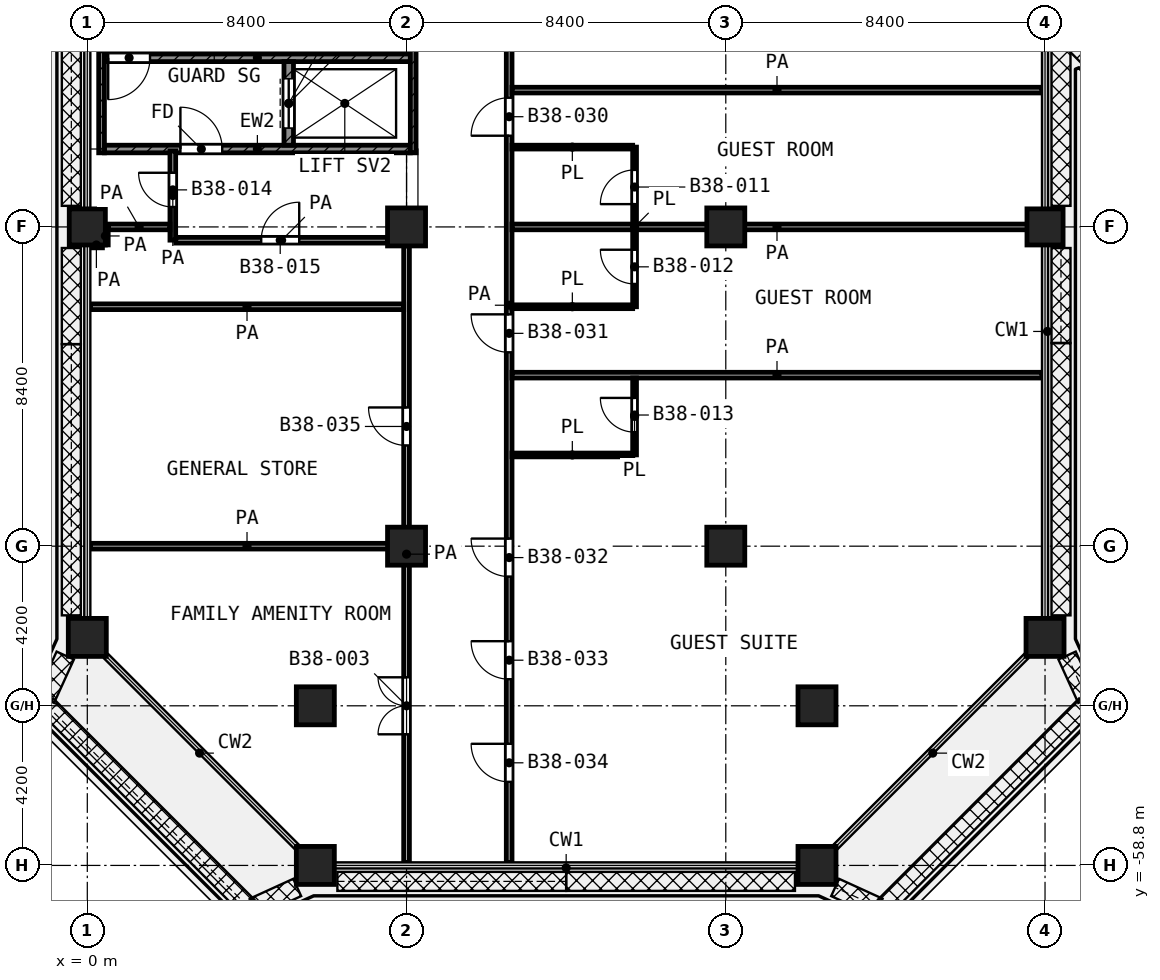
"""IFC4 building model, lengths in metres.
Left out: names, types, materials, properties, quantities, classifications, styles, units other than length and angle.
Written with IfcOpenShell. Run it as: python <this file> out.ifc"""

import sys

from ifc_helpers import new_model, si_unit, direction, frame, frame_2d, origin, origin_2d, place, context, subcontext, project, spatial, rectangle, extrude, element, fill, save


model = new_model("IFC4")
c1 = context("Model", 3, precision=1e-05, world=origin(), true_north=direction((0.0, 1.0)))
c2 = subcontext(c1, "Body", "Model", "MODEL_VIEW")
j1 = project(units=[si_unit("LENGTHUNIT", "METRE"), si_unit("PLANEANGLEUNIT", "RADIAN")], contexts=[c1])
p1 = place(None, origin())
s1 = spatial("IfcSite", under=j1, at=p1, CompositionType="ELEMENT")
p2 = place(p1, origin())
s2 = spatial("IfcBuilding", under=s1, at=p2, CompositionType="ELEMENT")
p3 = place(p2, frame((0.0, 0.0, 166.8)))
s3 = spatial("IfcBuildingStorey", under=s2, at=p3, CompositionType="ELEMENT", Elevation=166.8)
p4 = place(p3, frame((0.0, -42.0, 0.0), z_axis=(0.0, 0.0, 1.0), x_axis=(1.0, 0.0, 0.0)))
e1 = element("IfcColumn", 1, at=p4, inside=s3, PredefinedType="COLUMN", context=c2, shape_type="SweptSolid", body=[
    extrude(rectangle(XDim=0.95, YDim=0.95, at=origin_2d()), origin(), (0.0, 0.0, 1.0), 4.2),
])
for number, where, z_axis, x_axis in (
    (2, (8.4, -42.0, 0.0), (0.0, 0.0, 1.0), (1.0, 0.0, 0.0)),
    (3, (16.8, -42.0, 0.0), (0.0, 0.0, 1.0), (1.0, 0.0, 0.0)),
):
    element("IfcColumn", number, at=place(p3, frame(where, z_axis=z_axis, x_axis=x_axis)), inside=s3, PredefinedType="COLUMN", context=c2, shape_type="SweptSolid", body=[
        extrude(rectangle(XDim=1.0, YDim=1.0, at=origin_2d()), origin(), (0.0, 0.0, 1.0), 4.2),
    ])
p5 = place(p3, frame((25.2, -42.0, 0.0), z_axis=(0.0, 0.0, 1.0), x_axis=(1.0, 0.0, 0.0)))
e4 = element("IfcColumn", 4, at=p5, inside=s3, PredefinedType="COLUMN", context=c2, shape_type="SweptSolid", body=[
    extrude(rectangle(XDim=0.95, YDim=0.95, at=origin_2d()), origin(), (0.0, 0.0, 1.0), 4.2),
])
for number, where, z_axis, x_axis in (
    (5, (8.4, -50.4, 0.0), (0.0, 0.0, 1.0), (1.0, 0.0, 0.0)),
    (6, (16.8, -50.4, 0.0), (0.0, 0.0, 1.0), (1.0, 0.0, 0.0)),
    (7, (0.0, -52.8, 0.0), (0.0, 0.0, 1.0), (1.0, 0.0, 0.0)),
    (8, (25.2, -52.8, 0.0), (0.0, 0.0, 1.0), (1.0, 0.0, 0.0)),
    (9, (6.0, -54.6, 0.0), (0.0, 0.0, 1.0), (1.0, 0.0, 0.0)),
    (10, (19.2, -54.6, 0.0), (0.0, 0.0, 1.0), (1.0, 0.0, 0.0)),
    (11, (6.0, -58.8, 0.0), (0.0, 0.0, 1.0), (1.0, 0.0, 0.0)),
    (12, (19.2, -58.8, 0.0), (0.0, 0.0, 1.0), (1.0, 0.0, 0.0)),
):
    element("IfcColumn", number, at=place(p3, frame(where, z_axis=z_axis, x_axis=x_axis)), inside=s3, PredefinedType="COLUMN", context=c2, shape_type="SweptSolid", body=[
        extrude(rectangle(XDim=1.0, YDim=1.0, at=origin_2d()), origin(), (0.0, 0.0, 1.0), 4.2),
    ])
p6 = place(p3, frame((0.375, -40.05, 0.0), z_axis=(0.0, 0.0, 1.0), x_axis=(0.0, 1.0, 0.0)))
e13 = element("IfcWall", 13, at=p6, inside=s3, PredefinedType="SHEAR", context=c2, shape_type="SweptSolid", body=[
    extrude(rectangle(XDim=5.975, YDim=0.15, at=frame_2d((2.988, 0.0))), origin(), (0.0, 0.0, 1.0), 3.6),
])
p7 = place(p3, frame((8.575, -40.05, 0.0), z_axis=(0.0, 0.0, 1.0), x_axis=(0.0, 1.0, 0.0)))
e14 = element("IfcWall", 14, at=p7, inside=s3, PredefinedType="SHEAR", context=c2, shape_type="SweptSolid", body=[
    extrude(rectangle(XDim=5.95, YDim=0.15, at=frame_2d((2.975, 0.0))), origin(), (0.0, 0.0, 1.0), 3.6),
])
p8 = place(p3, frame((0.45, -37.55, 0.0), z_axis=(0.0, 0.0, 1.0), x_axis=(1.0, 0.0, 0.0)))
e15 = element("IfcWall", 15, at=p8, inside=s3, PredefinedType="SHEAR", context=c2, shape_type="SweptSolid", body=[
    extrude(rectangle(XDim=8.05, YDim=0.2, at=frame_2d((4.025, 0.0))), origin(), (0.0, 0.0, 1.0), 3.6),
])
p9 = place(p8, frame((0.1, 0.0, 0.0)))
e16 = element("IfcOpeningElement", 16, at=p9, cuts=e15, PredefinedType="OPENING", context=c2, shape_type="SweptSolid", body=[
    extrude(rectangle(XDim=1.1, YDim=2.1, at=frame_2d((0.55, 1.05))), frame((0.0, 0.11, 0.0), z_axis=(0.0, -1.0, 0.0), x_axis=(1.0, 0.0, 0.0)), (0.0, 0.0, 1.0), 0.22),
])
p10 = place(p3, frame((0.45, -39.95, 0.0), z_axis=(0.0, 0.0, 1.0), x_axis=(1.0, 0.0, 0.0)))
e17 = element("IfcWall", 17, at=p10, inside=s3, PredefinedType="SHEAR", context=c2, shape_type="SweptSolid", body=[
    extrude(rectangle(XDim=8.05, YDim=0.2, at=frame_2d((4.025, 0.0))), origin(), (0.0, 0.0, 1.0), 3.6),
])
p11 = place(p10, frame((2.0, 0.0, 0.0)))
e18 = element("IfcOpeningElement", 18, at=p11, cuts=e17, PredefinedType="OPENING", context=c2, shape_type="SweptSolid", body=[
    extrude(rectangle(XDim=1.1, YDim=2.1, at=frame_2d((0.55, 1.05))), frame((0.0, 0.11, 0.0), z_axis=(0.0, -1.0, 0.0), x_axis=(1.0, 0.0, 0.0)), (0.0, 0.0, 1.0), 0.22),
])
p12 = place(p3, frame((5.3, -39.85, 0.0), z_axis=(0.0, 0.0, 1.0), x_axis=(0.0, 1.0, 0.0)))
e19 = element("IfcWall", 19, at=p12, inside=s3, PredefinedType="SHEAR", context=c2, shape_type="SweptSolid", body=[
    extrude(rectangle(XDim=2.2, YDim=0.25, at=frame_2d((1.1, 0.0))), origin(), (0.0, 0.0, 1.0), 3.6),
])
p13 = place(p12, frame((0.45, 0.0, 0.0)))
e20 = element("IfcOpeningElement", 20, at=p13, cuts=e19, PredefinedType="OPENING", context=c2, shape_type="SweptSolid", body=[
    extrude(rectangle(XDim=1.3, YDim=2.1, at=frame_2d((0.65, 1.05))), frame((0.0, 0.135, 0.0), z_axis=(0.0, -1.0, 0.0), x_axis=(1.0, 0.0, 0.0)), (0.0, 0.0, 1.0), 0.27),
])
p14 = place(p3, frame((11.175, -48.0, 0.0), z_axis=(0.0, 0.0, 1.0), x_axis=(1.0, 0.0, 0.0)))
e21 = element("IfcWall", 21, at=p14, inside=s3, PredefinedType="PARTITIONING", context=c2, shape_type="SweptSolid", body=[
    extrude(rectangle(XDim=3.174, YDim=0.1, at=frame_2d((1.587, 0.0))), origin(), (0.0, 0.0, 1.0), 3.6),
])
for number, where, z_axis, x_axis in (
    (22, (11.175, -44.1, 0.0), (0.0, 0.0, 1.0), (1.0, 0.0, 0.0)),
    (23, (11.175, -39.9, 0.0), (0.0, 0.0, 1.0), (1.0, 0.0, 0.0)),
):
    element("IfcWall", number, at=place(p3, frame(where, z_axis=z_axis, x_axis=x_axis)), inside=s3, PredefinedType="PARTITIONING", context=c2, shape_type="SweptSolid", body=[
        extrude(rectangle(XDim=3.175, YDim=0.1, at=frame_2d((1.587, 0.0))), origin(), (0.0, 0.0, 1.0), 3.6),
    ])
p15 = place(p3, frame((14.4, -47.998, 0.0), z_axis=(0.0, 0.0, 1.0), x_axis=(0.0, 1.0, 0.0)))
e24 = element("IfcWall", 24, at=p15, inside=s3, PredefinedType="PARTITIONING", context=c2, shape_type="SweptSolid", body=[
    extrude(rectangle(XDim=2.023, YDim=0.1, at=frame_2d((1.011, 0.0))), origin(), (0.0, 0.0, 1.0), 3.6),
])
p16 = place(p15, frame((0.599, 0.0, 0.0)))
e25 = element("IfcOpeningElement", 25, at=p16, cuts=e24, PredefinedType="OPENING", context=c2, shape_type="SweptSolid", body=[
    extrude(rectangle(XDim=0.9, YDim=2.1, at=frame_2d((0.45, 1.05))), frame((0.0, 0.06, 0.0), z_axis=(0.0, -1.0, 0.0), x_axis=(1.0, 0.0, 0.0)), (0.0, 0.0, 1.0), 0.12),
])
p17 = place(p3, frame((14.4, -44.1, 0.0), z_axis=(0.0, 0.0, 1.0), x_axis=(0.0, 1.0, 0.0)))
e26 = element("IfcWall", 26, at=p17, inside=s3, PredefinedType="PARTITIONING", context=c2, shape_type="SweptSolid", body=[
    extrude(rectangle(XDim=4.2, YDim=0.1, at=frame_2d((2.1, 0.0))), origin(), (0.0, 0.0, 1.0), 3.6),
])
p18 = place(p17, frame((2.7, 0.0, 0.0)))
e27 = element("IfcOpeningElement", 27, at=p18, cuts=e26, PredefinedType="OPENING", context=c2, shape_type="SweptSolid", body=[
    extrude(rectangle(XDim=0.9, YDim=2.1, at=frame_2d((0.45, 1.05))), frame((0.0, 0.06, 0.0), z_axis=(0.0, -1.0, 0.0), x_axis=(1.0, 0.0, 0.0)), (0.0, 0.0, 1.0), 0.12),
])
p19 = place(p17, frame((0.6, 0.0, 0.0)))
e28 = element("IfcOpeningElement", 28, at=p19, cuts=e26, PredefinedType="OPENING", context=c2, shape_type="SweptSolid", body=[
    extrude(rectangle(XDim=0.9, YDim=2.1, at=frame_2d((0.45, 1.05))), frame((0.0, 0.06, 0.0), z_axis=(0.0, -1.0, 0.0), x_axis=(1.0, 0.0, 0.0)), (0.0, 0.0, 1.0), 0.12),
])
p20 = place(p3, frame((0.08, -50.4, 0.0), z_axis=(0.0, 0.0, 1.0), x_axis=(1.0, 0.0, 0.0)))
e29 = element("IfcWall", 29, at=p20, inside=s3, PredefinedType="PARTITIONING", context=c2, shape_type="SweptSolid", body=[
    extrude(rectangle(XDim=8.245, YDim=0.15, at=frame_2d((4.123, 0.0))), origin(), (0.0, 0.0, 1.0), 3.6),
])
p21 = place(p3, frame((11.175, -45.9, 0.0), z_axis=(0.0, 0.0, 1.0), x_axis=(1.0, 0.0, 0.0)))
e30 = element("IfcWall", 30, at=p21, inside=s3, PredefinedType="PARTITIONING", context=c2, shape_type="SweptSolid", body=[
    extrude(rectangle(XDim=13.945, YDim=0.15, at=frame_2d((6.973, 0.0))), origin(), (0.0, 0.0, 1.0), 3.6),
])
p22 = place(p3, frame((0.08, -44.1, 0.0), z_axis=(0.0, 0.0, 1.0), x_axis=(1.0, 0.0, 0.0)))
e31 = element("IfcWall", 31, at=p22, inside=s3, PredefinedType="PARTITIONING", context=c2, shape_type="SweptSolid", body=[
    extrude(rectangle(XDim=8.245, YDim=0.15, at=frame_2d((4.123, 0.0))), origin(), (0.0, 0.0, 1.0), 3.6),
])
p23 = place(p3, frame((0.08, -42.475, 0.0), z_axis=(0.0, 0.0, 1.0), x_axis=(1.0, 0.0, 0.0)))
e32 = element("IfcWall", 32, at=p23, inside=s3, PredefinedType="PARTITIONING", context=c2, shape_type="SweptSolid", body=[
    extrude(rectangle(XDim=0.318, YDim=0.15, at=frame_2d((0.159, 0.0))), origin(), (0.0, 0.0, 1.0), 3.6),
])
p24 = place(p3, frame((2.327, -42.35, 0.0), z_axis=(0.0, 0.0, 1.0), x_axis=(1.0, 0.0, 0.0)))
e33 = element("IfcWall", 33, at=p24, inside=s3, PredefinedType="PARTITIONING", context=c2, shape_type="SweptSolid", body=[
    extrude(rectangle(XDim=5.573, YDim=0.15, at=frame_2d((2.787, 0.0))), origin(), (0.0, 0.0, 1.0), 3.6),
])
p25 = place(p24, frame((2.249, 0.0, 0.0)))
e34 = element("IfcOpeningElement", 34, at=p25, cuts=e33, PredefinedType="OPENING", context=c2, shape_type="SweptSolid", body=[
    extrude(rectangle(XDim=1.0, YDim=2.1, at=frame_2d((0.5, 1.05))), frame((0.0, 0.085, 0.0), z_axis=(0.0, -1.0, 0.0), x_axis=(1.0, 0.0, 0.0)), (0.0, 0.0, 1.0), 0.17),
])
p26 = place(p3, frame((0.552, -42.0, 0.0), z_axis=(0.0, 0.0, 1.0), x_axis=(1.0, 0.0, 0.0)))
e35 = element("IfcWall", 35, at=p26, inside=s3, PredefinedType="PARTITIONING", context=c2, shape_type="SweptSolid", body=[
    extrude(rectangle(XDim=1.623, YDim=0.15, at=frame_2d((0.812, 0.0))), origin(), (0.0, 0.0, 1.0), 3.6),
])
for number, where, z_axis, x_axis in (
    (36, (11.175, -42.0, 0.0), (0.0, 0.0, 1.0), (1.0, 0.0, 0.0)),
    (37, (11.175, -38.4, 0.0), (0.0, 0.0, 1.0), (1.0, 0.0, 0.0)),
):
    element("IfcWall", number, at=place(p3, frame(where, z_axis=z_axis, x_axis=x_axis)), inside=s3, PredefinedType="PARTITIONING", context=c2, shape_type="SweptSolid", body=[
        extrude(rectangle(XDim=13.945, YDim=0.15, at=frame_2d((6.973, 0.0))), origin(), (0.0, 0.0, 1.0), 3.6),
    ])
p27 = place(p3, frame((0.475, -42.473, 0.0), z_axis=(0.0, 0.0, 1.0), x_axis=(0.0, 1.0, 0.0)))
e38 = element("IfcWall", 38, at=p27, inside=s3, PredefinedType="PARTITIONING", context=c2, shape_type="SweptSolid", body=[
    extrude(rectangle(XDim=0.471, YDim=0.15, at=frame_2d((0.235, 0.0))), origin(), (0.0, 0.0, 1.0), 3.6),
])
p28 = place(p3, frame((2.25, -42.348, 0.0), z_axis=(0.0, 0.0, 1.0), x_axis=(0.0, 1.0, 0.0)))
e39 = element("IfcWall", 39, at=p28, inside=s3, PredefinedType="PARTITIONING", context=c2, shape_type="SweptSolid", body=[
    extrude(rectangle(XDim=2.348, YDim=0.15, at=frame_2d((1.174, 0.0))), origin(), (0.0, 0.0, 1.0), 3.6),
])
p29 = place(p28, frame((0.873, 0.0, 0.0)))
e40 = element("IfcOpeningElement", 40, at=p29, cuts=e39, PredefinedType="OPENING", context=c2, shape_type="SweptSolid", body=[
    extrude(rectangle(XDim=0.9, YDim=2.1, at=frame_2d((0.45, 1.05))), frame((0.0, 0.085, 0.0), z_axis=(0.0, -1.0, 0.0), x_axis=(1.0, 0.0, 0.0)), (0.0, 0.0, 1.0), 0.17),
])
p30 = place(p3, frame((8.4, -58.72, 0.0), z_axis=(0.0, 0.0, 1.0), x_axis=(0.0, 1.0, 0.0)))
e41 = element("IfcWall", 41, at=p30, inside=s3, PredefinedType="PARTITIONING", context=c2, shape_type="SweptSolid", body=[
    extrude(rectangle(XDim=16.22, YDim=0.15, at=frame_2d((8.11, 0.0))), origin(), (0.0, 0.0, 1.0), 3.6),
])
p31 = place(p30, frame((3.37, 0.0, 0.0)))
e42 = element("IfcOpeningElement", 42, at=p31, cuts=e41, PredefinedType="OPENING", context=c2, shape_type="SweptSolid", body=[
    extrude(rectangle(XDim=1.5, YDim=2.1, at=frame_2d((0.75, 1.05))), frame((0.0, 0.085, 0.0), z_axis=(0.0, -1.0, 0.0), x_axis=(1.0, 0.0, 0.0)), (0.0, 0.0, 1.0), 0.17),
])
p32 = place(p30, frame((10.97, 0.0, 0.0)))
e43 = element("IfcOpeningElement", 43, at=p32, cuts=e41, PredefinedType="OPENING", context=c2, shape_type="SweptSolid", body=[
    extrude(rectangle(XDim=1.0, YDim=2.1, at=frame_2d((0.5, 1.05))), frame((0.0, 0.085, 0.0), z_axis=(0.0, -1.0, 0.0), x_axis=(1.0, 0.0, 0.0)), (0.0, 0.0, 1.0), 0.17),
])
p33 = place(p3, frame((11.1, -58.72, 0.0), z_axis=(0.0, 0.0, 1.0), x_axis=(0.0, 1.0, 0.0)))
e44 = element("IfcWall", 44, at=p33, inside=s3, PredefinedType="PARTITIONING", context=c2, shape_type="SweptSolid", body=[
    extrude(rectangle(XDim=29.32, YDim=0.15, at=frame_2d((14.66, 0.0))), origin(), (0.0, 0.0, 1.0), 3.6),
])
p34 = place(p33, frame((24.07, 0.0, 0.0)))
e45 = element("IfcOpeningElement", 45, at=p34, cuts=e44, PredefinedType="OPENING", context=c2, shape_type="SweptSolid", body=[
    extrude(rectangle(XDim=1.5, YDim=2.1, at=frame_2d((0.75, 1.05))), frame((0.0, 0.085, 0.0), z_axis=(0.0, -1.0, 0.0), x_axis=(1.0, 0.0, 0.0)), (0.0, 0.0, 1.0), 0.17),
])
p35 = place(p33, frame((19.12, 0.0, 0.0)))
e46 = element("IfcOpeningElement", 46, at=p35, cuts=e44, PredefinedType="OPENING", context=c2, shape_type="SweptSolid", body=[
    extrude(rectangle(XDim=1.0, YDim=2.1, at=frame_2d((0.5, 1.05))), frame((0.0, 0.085, 0.0), z_axis=(0.0, -1.0, 0.0), x_axis=(1.0, 0.0, 0.0)), (0.0, 0.0, 1.0), 0.17),
])
p36 = place(p33, frame((13.42, 0.0, 0.0)))
e47 = element("IfcOpeningElement", 47, at=p36, cuts=e44, PredefinedType="OPENING", context=c2, shape_type="SweptSolid", body=[
    extrude(rectangle(XDim=1.0, YDim=2.1, at=frame_2d((0.5, 1.05))), frame((0.0, 0.085, 0.0), z_axis=(0.0, -1.0, 0.0), x_axis=(1.0, 0.0, 0.0)), (0.0, 0.0, 1.0), 0.17),
])
p37 = place(p33, frame((7.52, 0.0, 0.0)))
e48 = element("IfcOpeningElement", 48, at=p37, cuts=e44, PredefinedType="OPENING", context=c2, shape_type="SweptSolid", body=[
    extrude(rectangle(XDim=1.0, YDim=2.1, at=frame_2d((0.5, 1.05))), frame((0.0, 0.085, 0.0), z_axis=(0.0, -1.0, 0.0), x_axis=(1.0, 0.0, 0.0)), (0.0, 0.0, 1.0), 0.17),
])
p38 = place(p33, frame((4.82, 0.0, 0.0)))
e49 = element("IfcOpeningElement", 49, at=p38, cuts=e44, PredefinedType="OPENING", context=c2, shape_type="SweptSolid", body=[
    extrude(rectangle(XDim=1.0, YDim=2.1, at=frame_2d((0.5, 1.05))), frame((0.0, 0.085, 0.0), z_axis=(0.0, -1.0, 0.0), x_axis=(1.0, 0.0, 0.0)), (0.0, 0.0, 1.0), 0.17),
])
p39 = place(p33, frame((2.12, 0.0, 0.0)))
e50 = element("IfcOpeningElement", 50, at=p39, cuts=e44, PredefinedType="OPENING", context=c2, shape_type="SweptSolid", body=[
    extrude(rectangle(XDim=1.0, YDim=2.1, at=frame_2d((0.5, 1.05))), frame((0.0, 0.085, 0.0), z_axis=(0.0, -1.0, 0.0), x_axis=(1.0, 0.0, 0.0)), (0.0, 0.0, 1.0), 0.17),
])
p40 = place(p9, frame((1.1, 0.0, 0.0), z_axis=(0.0, 0.0, 1.0), x_axis=(-1.0, 0.0, 0.0)))
e51 = element("IfcDoor", 51, at=p40, inside=s3, OperationType="SINGLE_SWING_LEFT", PredefinedType="DOOR", context=c2, shape_type="SweptSolid", body=[
    extrude(rectangle(XDim=1.1, YDim=2.1, at=frame_2d((0.55, 1.05))), frame((0.0, 0.025, 0.0), z_axis=(0.0, -1.0, 0.0), x_axis=(1.0, 0.0, 0.0)), (0.0, 0.0, 1.0), 0.05),
])
fill(e16, e51)
p41 = place(p13, origin())
e52 = element("IfcDoor", 52, at=p41, inside=s3, OperationType="DOUBLE_DOOR_SLIDING", PredefinedType="DOOR", context=c2, shape_type="SweptSolid", body=[
    extrude(rectangle(XDim=1.3, YDim=2.1, at=frame_2d((0.65, 1.05))), frame((0.0, 0.025, 0.0), z_axis=(0.0, -1.0, 0.0), x_axis=(1.0, 0.0, 0.0)), (0.0, 0.0, 1.0), 0.05),
])
fill(e20, e52)
p42 = place(p11, origin())
e53 = element("IfcDoor", 53, at=p42, inside=s3, OperationType="SINGLE_SWING_LEFT", PredefinedType="DOOR", context=c2, shape_type="SweptSolid", body=[
    extrude(rectangle(XDim=1.1, YDim=2.1, at=frame_2d((0.55, 1.05))), frame((0.0, 0.025, 0.0), z_axis=(0.0, -1.0, 0.0), x_axis=(1.0, 0.0, 0.0)), (0.0, 0.0, 1.0), 0.05),
])
fill(e18, e53)
p43 = place(p31, origin())
e54 = element("IfcDoor", 54, at=p43, inside=s3, OperationType="DOUBLE_DOOR_SINGLE_SWING", PredefinedType="DOOR", context=c2, shape_type="SweptSolid", body=[
    extrude(rectangle(XDim=1.5, YDim=2.1, at=frame_2d((0.75, 1.05))), frame((0.0, 0.025, 0.0), z_axis=(0.0, -1.0, 0.0), x_axis=(1.0, 0.0, 0.0)), (0.0, 0.0, 1.0), 0.05),
])
fill(e42, e54)
p44 = place(p35, origin())
e55 = element("IfcDoor", 55, at=p44, inside=s3, OperationType="SINGLE_SWING_LEFT", PredefinedType="DOOR", context=c2, shape_type="SweptSolid", body=[
    extrude(rectangle(XDim=1.0, YDim=2.1, at=frame_2d((0.5, 1.05))), frame((0.0, 0.025, 0.0), z_axis=(0.0, -1.0, 0.0), x_axis=(1.0, 0.0, 0.0)), (0.0, 0.0, 1.0), 0.05),
])
fill(e46, e55)
p45 = place(p18, origin())
e56 = element("IfcDoor", 56, at=p45, inside=s3, OperationType="SINGLE_SWING_LEFT", PredefinedType="DOOR", context=c2, shape_type="SweptSolid", body=[
    extrude(rectangle(XDim=0.9, YDim=2.1, at=frame_2d((0.45, 1.05))), frame((0.0, 0.025, 0.0), z_axis=(0.0, -1.0, 0.0), x_axis=(1.0, 0.0, 0.0)), (0.0, 0.0, 1.0), 0.05),
])
fill(e27, e56)
p46 = place(p36, origin())
e57 = element("IfcDoor", 57, at=p46, inside=s3, OperationType="SINGLE_SWING_RIGHT", PredefinedType="DOOR", context=c2, shape_type="SweptSolid", body=[
    extrude(rectangle(XDim=1.0, YDim=2.1, at=frame_2d((0.5, 1.05))), frame((0.0, 0.025, 0.0), z_axis=(0.0, -1.0, 0.0), x_axis=(1.0, 0.0, 0.0)), (0.0, 0.0, 1.0), 0.05),
])
fill(e47, e57)
p47 = place(p19, origin())
e58 = element("IfcDoor", 58, at=p47, inside=s3, OperationType="SINGLE_SWING_RIGHT", PredefinedType="DOOR", context=c2, shape_type="SweptSolid", body=[
    extrude(rectangle(XDim=0.9, YDim=2.1, at=frame_2d((0.45, 1.05))), frame((0.0, 0.025, 0.0), z_axis=(0.0, -1.0, 0.0), x_axis=(1.0, 0.0, 0.0)), (0.0, 0.0, 1.0), 0.05),
])
fill(e28, e58)
p48 = place(p37, origin())
e59 = element("IfcDoor", 59, at=p48, inside=s3, OperationType="SINGLE_SWING_RIGHT", PredefinedType="DOOR", context=c2, shape_type="SweptSolid", body=[
    extrude(rectangle(XDim=1.0, YDim=2.1, at=frame_2d((0.5, 1.05))), frame((0.0, 0.025, 0.0), z_axis=(0.0, -1.0, 0.0), x_axis=(1.0, 0.0, 0.0)), (0.0, 0.0, 1.0), 0.05),
])
fill(e48, e59)
p49 = place(p38, origin())
e60 = element("IfcDoor", 60, at=p49, inside=s3, OperationType="SINGLE_SWING_RIGHT", PredefinedType="DOOR", context=c2, shape_type="SweptSolid", body=[
    extrude(rectangle(XDim=1.0, YDim=2.1, at=frame_2d((0.5, 1.05))), frame((0.0, 0.025, 0.0), z_axis=(0.0, -1.0, 0.0), x_axis=(1.0, 0.0, 0.0)), (0.0, 0.0, 1.0), 0.05),
])
fill(e49, e60)
p50 = place(p39, origin())
e61 = element("IfcDoor", 61, at=p50, inside=s3, OperationType="SINGLE_SWING_RIGHT", PredefinedType="DOOR", context=c2, shape_type="SweptSolid", body=[
    extrude(rectangle(XDim=1.0, YDim=2.1, at=frame_2d((0.5, 1.05))), frame((0.0, 0.025, 0.0), z_axis=(0.0, -1.0, 0.0), x_axis=(1.0, 0.0, 0.0)), (0.0, 0.0, 1.0), 0.05),
])
fill(e50, e61)
p51 = place(p16, origin())
e62 = element("IfcDoor", 62, at=p51, inside=s3, OperationType="SINGLE_SWING_RIGHT", PredefinedType="DOOR", context=c2, shape_type="SweptSolid", body=[
    extrude(rectangle(XDim=0.9, YDim=2.1, at=frame_2d((0.45, 1.05))), frame((0.0, 0.025, 0.0), z_axis=(0.0, -1.0, 0.0), x_axis=(1.0, 0.0, 0.0)), (0.0, 0.0, 1.0), 0.05),
])
fill(e25, e62)
p52 = place(p29, origin())
e63 = element("IfcDoor", 63, at=p52, inside=s3, OperationType="SINGLE_SWING_RIGHT", PredefinedType="DOOR", context=c2, shape_type="SweptSolid", body=[
    extrude(rectangle(XDim=0.9, YDim=2.1, at=frame_2d((0.45, 1.05))), frame((0.0, 0.025, 0.0), z_axis=(0.0, -1.0, 0.0), x_axis=(1.0, 0.0, 0.0)), (0.0, 0.0, 1.0), 0.05),
])
fill(e40, e63)
p53 = place(p25, origin())
e64 = element("IfcDoor", 64, at=p53, inside=s3, OperationType="SINGLE_SWING_RIGHT", PredefinedType="DOOR", context=c2, shape_type="SweptSolid", body=[
    extrude(rectangle(XDim=1.0, YDim=2.1, at=frame_2d((0.5, 1.05))), frame((0.0, 0.025, 0.0), z_axis=(0.0, -1.0, 0.0), x_axis=(1.0, 0.0, 0.0)), (0.0, 0.0, 1.0), 0.05),
])
fill(e34, e64)
p54 = place(p32, origin())
e65 = element("IfcDoor", 65, at=p54, inside=s3, OperationType="SINGLE_SWING_RIGHT", PredefinedType="DOOR", context=c2, shape_type="SweptSolid", body=[
    extrude(rectangle(XDim=1.0, YDim=2.1, at=frame_2d((0.5, 1.05))), frame((0.0, 0.025, 0.0), z_axis=(0.0, -1.0, 0.0), x_axis=(1.0, 0.0, 0.0)), (0.0, 0.0, 1.0), 0.05),
])
fill(e43, e65)
save(model, sys.argv[1])
